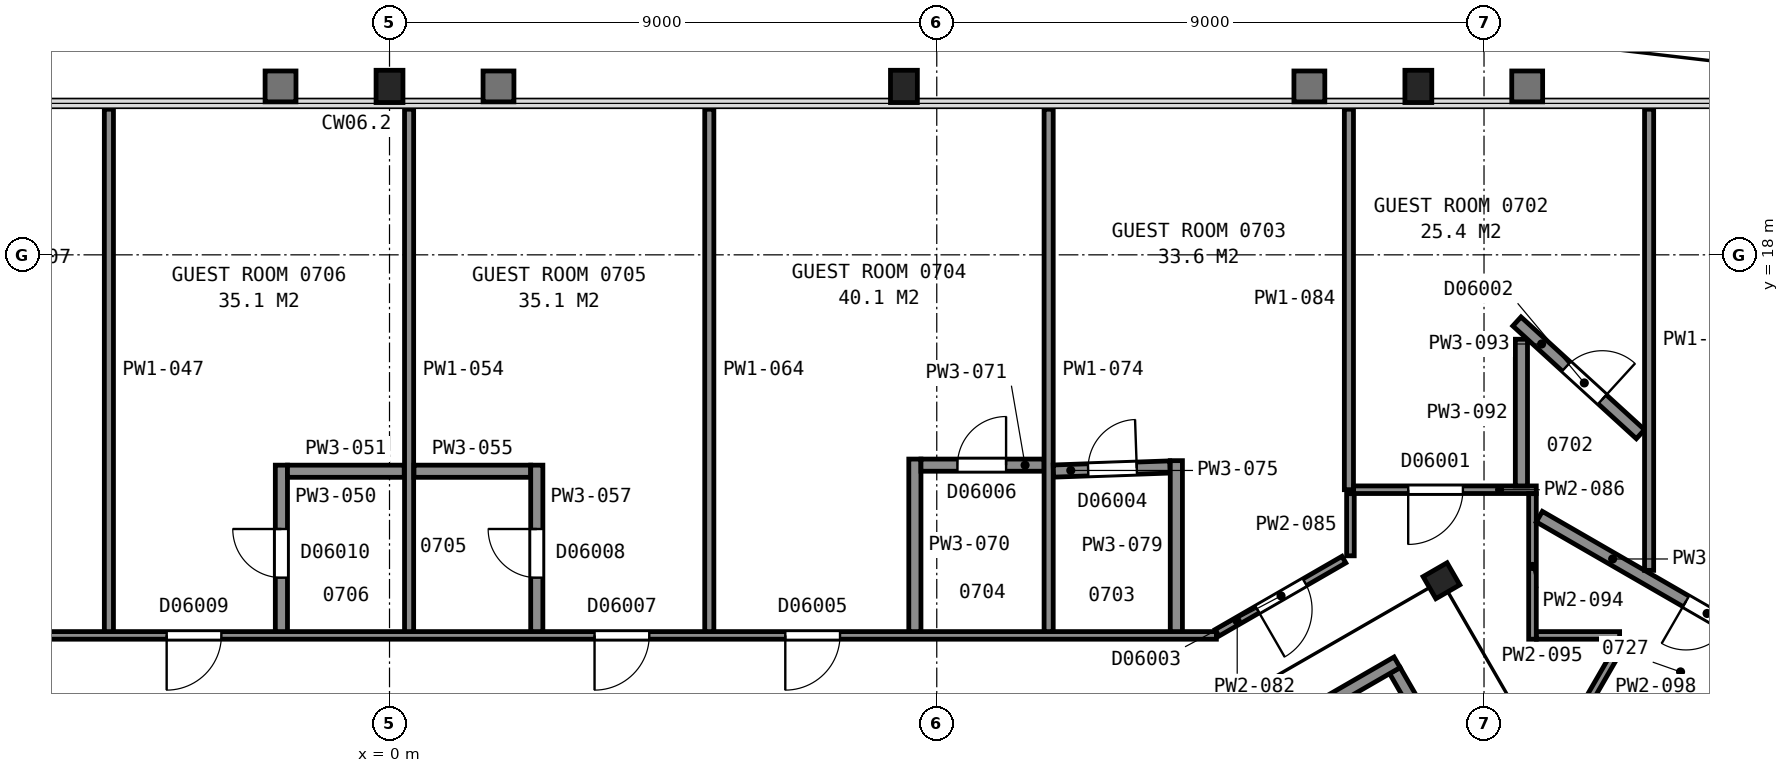
"""IFC4 building model, lengths in metres.
Left out: names, types, materials, properties, quantities, classifications, styles, units other than length and angle.
Written with IfcOpenShell. Run it as: python <this file> out.ifc"""

import sys

from ifc_helpers import new_model, si_unit, direction, frame, frame_2d, origin, origin_2d, place, context, subcontext, project, spatial, rectangle, i_section, extrude, element, fill, save


model = new_model("IFC4")
c1 = context("Model", 3, precision=1e-05, world=origin(), true_north=direction((0.0, 1.0)))
c2 = subcontext(c1, "Body", "Model", "MODEL_VIEW")
j1 = project(units=[si_unit("LENGTHUNIT", "METRE"), si_unit("PLANEANGLEUNIT", "RADIAN")], contexts=[c1])
p1 = place(None, origin())
s1 = spatial("IfcSite", under=j1, at=p1, CompositionType="ELEMENT")
p2 = place(p1, origin())
s2 = spatial("IfcBuilding", under=s1, at=p2, CompositionType="ELEMENT")
p3 = place(p2, frame((0.0, 0.0, 40.4)))
s3 = spatial("IfcBuildingStorey", under=s2, at=p3, CompositionType="ELEMENT", Elevation=40.4)
for number, where, z_axis, x_axis in (
    (1, (16.92, 20.77, 0.0), (0.0, 0.0, 1.0), (1.0, 0.0, 0.0)),
    (2, (8.46, 20.77, 0.0), (0.0, 0.0, 1.0), (1.0, 0.0, 0.0)),
    (3, (0.0, 20.77, 0.0), (0.0, 0.0, 1.0), (1.0, 0.0, 0.0)),
):
    element("IfcColumn", number, at=place(p3, frame(where, z_axis=z_axis, x_axis=x_axis)), inside=s3, PredefinedType="COLUMN", context=c2, shape_type="SweptSolid", body=[
        extrude(i_section(OverallWidth=0.442, OverallDepth=0.531, WebThickness=0.066, FlangeThickness=0.106, FilletRadius=0.015, at=origin_2d()), origin(), (0.0, 0.0, 1.0), 3.575),
    ])
p4 = place(p3, frame((17.3, 12.64, 0.0), z_axis=(0.0, 0.0, 1.0), x_axis=(0.5, -0.866025403784, 0.0)))
e4 = element("IfcColumn", 4, at=p4, inside=s3, PredefinedType="COLUMN", context=c2, shape_type="SweptSolid", body=[
    extrude(i_section(OverallWidth=0.419, OverallDepth=0.455, WebThickness=0.042, FlangeThickness=0.068, FilletRadius=0.015, at=origin_2d()), origin(), (0.0, 0.0, 1.0), 3.6),
])
p5 = place(p3, frame((17.934, 8.738, 0.0), z_axis=(0.0, 0.0, 1.0), x_axis=(-0.49998411664, 0.866034573852, 0.0)))
e5 = element("IfcWall", 5, at=p5, inside=s3, PredefinedType="PARTITIONING", context=c2, shape_type="SweptSolid", body=[
    extrude(rectangle(XDim=2.8, YDim=0.2, at=frame_2d((1.4, 0.0))), origin(), (0.0, 0.0, 1.0), 3.35),
])
p6 = place(p5, frame((0.85, 0.0, 0.0)))
e6 = element("IfcOpeningElement", 6, at=p6, cuts=e5, PredefinedType="OPENING", context=c2, shape_type="SweptSolid", body=[
    extrude(rectangle(XDim=1.1, YDim=2.1, at=frame_2d((0.55, 1.05))), frame((0.0, 0.11, 0.0), z_axis=(0.0, -1.0, 0.0), x_axis=(1.0, 0.0, 0.0)), (0.0, 0.0, 1.0), 0.22),
])
p7 = place(p3, frame((6.178, 5.299, 0.0), z_axis=(0.0, 0.0, 1.0), x_axis=(0.866026010844, 0.49999894854, 0.0)))
e7 = element("IfcWall", 7, at=p7, inside=s3, PredefinedType="PARTITIONING", context=c2, shape_type="SweptSolid", body=[
    extrude(rectangle(XDim=12.0, YDim=0.2, at=frame_2d((6.0, 0.0))), origin(), (0.0, 0.0, 1.0), 3.35),
])
p8 = place(p3, frame((-13.598, 11.741, 0.0), z_axis=(0.0, 0.0, 1.0), x_axis=(1.0, 0.0, 0.0)))
e8 = element("IfcWall", 8, at=p8, inside=s3, PredefinedType="PARTITIONING", context=c2, shape_type="SweptSolid", body=[
    extrude(rectangle(XDim=27.197, YDim=0.125, at=frame_2d((13.598, 0.0))), origin(), (0.0, 0.0, 1.0), 2.613),
])
p9 = place(p8, frame((20.107, 0.0, 0.0)))
e9 = element("IfcOpeningElement", 9, at=p9, cuts=e8, PredefinedType="OPENING", context=c2, shape_type="SweptSolid", body=[
    extrude(rectangle(XDim=0.9, YDim=2.1, at=frame_2d((0.45, 1.05))), frame((0.0, 0.073, 0.0), z_axis=(0.0, -1.0, 0.0), x_axis=(1.0, 0.0, 0.0)), (0.0, 0.0, 1.0), 0.145),
])
p10 = place(p8, frame((16.97, 0.0, 0.0)))
e10 = element("IfcOpeningElement", 10, at=p10, cuts=e8, PredefinedType="OPENING", context=c2, shape_type="SweptSolid", body=[
    extrude(rectangle(XDim=0.9, YDim=2.1, at=frame_2d((0.45, 1.05))), frame((0.0, 0.073, 0.0), z_axis=(0.0, -1.0, 0.0), x_axis=(1.0, 0.0, 0.0)), (0.0, 0.0, 1.0), 0.145),
])
p11 = place(p8, frame((9.934, 0.0, 0.0)))
e11 = element("IfcOpeningElement", 11, at=p11, cuts=e8, PredefinedType="OPENING", context=c2, shape_type="SweptSolid", body=[
    extrude(rectangle(XDim=0.9, YDim=2.1, at=frame_2d((0.45, 1.05))), frame((0.0, 0.073, 0.0), z_axis=(0.0, -1.0, 0.0), x_axis=(1.0, 0.0, 0.0)), (0.0, 0.0, 1.0), 0.145),
])
p12 = place(p8, frame((6.858, 0.0, 0.0)))
e12 = element("IfcOpeningElement", 12, at=p12, cuts=e8, PredefinedType="OPENING", context=c2, shape_type="SweptSolid", body=[
    extrude(rectangle(XDim=1.0, YDim=2.1, at=frame_2d((0.5, 1.05))), frame((0.0, 0.073, 0.0), z_axis=(0.0, -1.0, 0.0), x_axis=(1.0, 0.0, 0.0)), (0.0, 0.0, 1.0), 0.145),
])
p13 = place(p3, frame((-4.615, 11.803, 0.0), z_axis=(0.0, 0.0, 1.0), x_axis=(0.0, 1.0, 0.0)))
e13 = element("IfcWall", 13, at=p13, inside=s3, PredefinedType="PARTITIONING", context=c2, shape_type="SweptSolid", body=[
    extrude(rectangle(XDim=8.592, YDim=0.15, at=frame_2d((4.296, 0.0))), origin(), (0.0, 0.0, 1.0), 2.613),
])
p14 = place(p3, frame((-1.778, 14.541, 0.0), z_axis=(0.0, 0.0, 1.0), x_axis=(0.0, -1.0, 0.0)))
e14 = element("IfcWall", 14, at=p14, inside=s3, PredefinedType="PARTITIONING", context=c2, shape_type="SweptSolid", body=[
    extrude(rectangle(XDim=2.738, YDim=0.2, at=frame_2d((1.369, 0.0))), origin(), (0.0, 0.0, 1.0), 2.613),
])
p15 = place(p14, frame((1.05, 0.0, 0.0)))
e15 = element("IfcOpeningElement", 15, at=p15, cuts=e14, PredefinedType="OPENING", context=c2, shape_type="SweptSolid", body=[
    extrude(rectangle(XDim=0.8, YDim=2.1, at=frame_2d((0.4, 1.05))), frame((0.0, 0.11, 0.0), z_axis=(0.0, -1.0, 0.0), x_axis=(1.0, 0.0, 0.0)), (0.0, 0.0, 1.0), 0.22),
])
p16 = place(p3, frame((-1.678, 14.441, 0.0), z_axis=(0.0, 0.0, 1.0), x_axis=(1.0, 0.0, 0.0)))
e16 = element("IfcWall", 16, at=p16, inside=s3, PredefinedType="PARTITIONING", context=c2, shape_type="SweptSolid", body=[
    extrude(rectangle(XDim=1.92, YDim=0.2, at=frame_2d((0.96, 0.0))), origin(), (0.0, 0.0, 1.0), 2.613),
])
p17 = place(p3, frame((0.322, 11.803, 0.0), z_axis=(0.0, 0.0, 1.0), x_axis=(0.0, 1.0, 0.0)))
e17 = element("IfcWall", 17, at=p17, inside=s3, PredefinedType="PARTITIONING", context=c2, shape_type="SweptSolid", body=[
    extrude(rectangle(XDim=8.592, YDim=0.15, at=frame_2d((4.296, 0.0))), origin(), (0.0, 0.0, 1.0), 2.613),
])
p18 = place(p3, frame((0.402, 14.441, 0.0), z_axis=(0.0, 0.0, 1.0), x_axis=(1.0, 0.0, 0.0)))
e18 = element("IfcWall", 18, at=p18, inside=s3, PredefinedType="PARTITIONING", context=c2, shape_type="SweptSolid", body=[
    extrude(rectangle(XDim=1.92, YDim=0.2, at=frame_2d((0.96, 0.0))), origin(), (0.0, 0.0, 1.0), 2.613),
])
p19 = place(p3, frame((2.422, 11.803, 0.0), z_axis=(0.0, 0.0, 1.0), x_axis=(0.0, 1.0, 0.0)))
e19 = element("IfcWall", 19, at=p19, inside=s3, PredefinedType="PARTITIONING", context=c2, shape_type="SweptSolid", body=[
    extrude(rectangle(XDim=2.738, YDim=0.2, at=frame_2d((1.369, 0.0))), origin(), (0.0, 0.0, 1.0), 2.613),
])
p20 = place(p19, frame((0.887, 0.0, 0.0)))
e20 = element("IfcOpeningElement", 20, at=p20, cuts=e19, PredefinedType="OPENING", context=c2, shape_type="SweptSolid", body=[
    extrude(rectangle(XDim=0.8, YDim=2.1, at=frame_2d((0.4, 1.05))), frame((0.0, 0.11, 0.0), z_axis=(0.0, -1.0, 0.0), x_axis=(1.0, 0.0, 0.0)), (0.0, 0.0, 1.0), 0.22),
])
p21 = place(p3, frame((5.259, 11.803, 0.0), z_axis=(0.0, 0.0, 1.0), x_axis=(0.0, 1.0, 0.0)))
e21 = element("IfcWall", 21, at=p21, inside=s3, PredefinedType="PARTITIONING", context=c2, shape_type="SweptSolid", body=[
    extrude(rectangle(XDim=8.592, YDim=0.15, at=frame_2d((4.296, 0.0))), origin(), (0.0, 0.0, 1.0), 2.613),
])
p22 = place(p3, frame((8.64, 11.803, 0.0), z_axis=(0.0, 0.0, 1.0), x_axis=(0.0, 1.0, 0.0)))
e22 = element("IfcWall", 22, at=p22, inside=s3, PredefinedType="PARTITIONING", context=c2, shape_type="SweptSolid", body=[
    extrude(rectangle(XDim=2.838, YDim=0.2, at=frame_2d((1.419, 0.0))), origin(), (0.0, 0.0, 1.0), 2.613),
])
p23 = place(p3, frame((10.765, 14.541, 0.0), z_axis=(0.0, 0.0, 1.0), x_axis=(-1.0, 0.0, 0.0)))
e23 = element("IfcWall", 23, at=p23, inside=s3, PredefinedType="PARTITIONING", context=c2, shape_type="SweptSolid", body=[
    extrude(rectangle(XDim=2.025, YDim=0.2, at=frame_2d((1.012, 0.0))), origin(), (0.0, 0.0, 1.0), 2.613),
])
p24 = place(p23, frame((0.625, 0.0, 0.0)))
e24 = element("IfcOpeningElement", 24, at=p24, cuts=e23, PredefinedType="OPENING", context=c2, shape_type="SweptSolid", body=[
    extrude(rectangle(XDim=0.8, YDim=2.1, at=frame_2d((0.4, 1.05))), frame((0.0, 0.11, 0.0), z_axis=(0.0, -1.0, 0.0), x_axis=(1.0, 0.0, 0.0)), (0.0, 0.0, 1.0), 0.22),
])
p25 = place(p3, frame((10.84, 11.803, 0.0), z_axis=(0.0, 0.0, 1.0), x_axis=(0.0, 1.0, 0.0)))
e25 = element("IfcWall", 25, at=p25, inside=s3, PredefinedType="PARTITIONING", context=c2, shape_type="SweptSolid", body=[
    extrude(rectangle(XDim=8.592, YDim=0.15, at=frame_2d((4.296, 0.0))), origin(), (0.0, 0.0, 1.0), 2.613),
])
p26 = place(p3, frame((12.835, 14.511, 0.0), z_axis=(0.0, 0.0, 1.0), x_axis=(-0.999382486529, -0.035137524367, 0.0)))
e26 = element("IfcWall", 26, at=p26, inside=s3, PredefinedType="PARTITIONING", context=c2, shape_type="SweptSolid", body=[
    extrude(rectangle(XDim=1.918, YDim=0.2, at=frame_2d((0.959, 0.0))), origin(), (0.0, 0.0, 1.0), 2.613),
])
p27 = place(p26, frame((0.546, 0.0, 0.0)))
e27 = element("IfcOpeningElement", 27, at=p27, cuts=e26, PredefinedType="OPENING", context=c2, shape_type="SweptSolid", body=[
    extrude(rectangle(XDim=0.8, YDim=2.1, at=frame_2d((0.4, 1.05))), frame((0.0, 0.11, 0.0), z_axis=(0.0, -1.0, 0.0), x_axis=(1.0, 0.0, 0.0)), (0.0, 0.0, 1.0), 0.22),
])
p28 = place(p3, frame((12.94, 11.803, 0.0), z_axis=(0.0, 0.0, 1.0), x_axis=(0.0, 1.0, 0.0)))
e28 = element("IfcWall", 28, at=p28, inside=s3, PredefinedType="PARTITIONING", context=c2, shape_type="SweptSolid", body=[
    extrude(rectangle(XDim=2.812, YDim=0.2, at=frame_2d((1.406, 0.0))), origin(), (0.0, 0.0, 1.0), 2.613),
])
p29 = place(p3, frame((13.61, 11.783, 0.0), z_axis=(0.0, 0.0, 1.0), x_axis=(0.86608938841, 0.499889158998, 0.0)))
e29 = element("IfcWall", 29, at=p29, inside=s3, PredefinedType="PARTITIONING", context=c2, shape_type="SweptSolid", body=[
    extrude(rectangle(XDim=2.409, YDim=0.125, at=frame_2d((1.204, 0.0))), origin(), (0.0, 0.0, 1.0), 2.613),
])
p30 = place(p29, frame((0.765, 0.0, 0.0)))
e30 = element("IfcOpeningElement", 30, at=p30, cuts=e29, PredefinedType="OPENING", context=c2, shape_type="SweptSolid", body=[
    extrude(rectangle(XDim=0.9, YDim=2.1, at=frame_2d((0.45, 1.05))), frame((0.0, 0.073, 0.0), z_axis=(0.0, -1.0, 0.0), x_axis=(1.0, 0.0, 0.0)), (0.0, 0.0, 1.0), 0.145),
])
p31 = place(p3, frame((15.778, 14.137, 0.0), z_axis=(0.0, 0.0, 1.0), x_axis=(0.0, 1.0, 0.0)))
e31 = element("IfcWall", 31, at=p31, inside=s3, PredefinedType="PARTITIONING", context=c2, shape_type="SweptSolid", body=[
    extrude(rectangle(XDim=6.258, YDim=0.15, at=frame_2d((3.129, 0.0))), origin(), (0.0, 0.0, 1.0), 2.613),
])
p32 = place(p3, frame((15.803, 13.05, 0.0), z_axis=(0.0, 0.0, 1.0), x_axis=(0.0, 1.0, 0.0)))
e32 = element("IfcWall", 32, at=p32, inside=s3, PredefinedType="PARTITIONING", context=c2, shape_type="SweptSolid", body=[
    extrude(rectangle(XDim=1.022, YDim=0.125, at=frame_2d((0.511, 0.0))), origin(), (0.0, 0.0, 1.0), 2.613),
])
p33 = place(p3, frame((15.855, 14.137, 0.0), z_axis=(0.0, 0.0, 1.0), x_axis=(1.0, 0.0, 0.0)))
e33 = element("IfcWall", 33, at=p33, inside=s3, PredefinedType="PARTITIONING", context=c2, shape_type="SweptSolid", body=[
    extrude(rectangle(XDim=3.004, YDim=0.125, at=frame_2d((1.502, 0.0))), origin(), (0.0, 0.0, 1.0), 2.613),
])
p34 = place(p33, frame((0.897, 0.0, 0.0)))
e34 = element("IfcOpeningElement", 34, at=p34, cuts=e33, PredefinedType="OPENING", context=c2, shape_type="SweptSolid", body=[
    extrude(rectangle(XDim=0.9, YDim=2.1, at=frame_2d((0.45, 1.05))), frame((0.0, 0.073, 0.0), z_axis=(0.0, -1.0, 0.0), x_axis=(1.0, 0.0, 0.0)), (0.0, 0.0, 1.0), 0.145),
])
p35 = place(p3, frame((18.615, 14.199, 0.0), z_axis=(0.0, 0.0, 1.0), x_axis=(0.0, 1.0, 0.0)))
e35 = element("IfcWall", 35, at=p35, inside=s3, PredefinedType="PARTITIONING", context=c2, shape_type="SweptSolid", body=[
    extrude(rectangle(XDim=2.413, YDim=0.2, at=frame_2d((1.206, 0.0))), origin(), (0.0, 0.0, 1.0), 2.613),
])
p36 = place(p3, frame((20.573, 15.05, 0.0), z_axis=(0.0, 0.0, 1.0), x_axis=(-0.738508553587, 0.674244107337, 0.0)))
e36 = element("IfcWall", 36, at=p36, inside=s3, PredefinedType="PARTITIONING", context=c2, shape_type="SweptSolid", body=[
    extrude(rectangle(XDim=2.75, YDim=0.2, at=frame_2d((1.375, 0.0))), origin(), (0.0, 0.0, 1.0), 2.613),
])
p37 = place(p36, frame((0.851, 0.0, 0.0)))
e37 = element("IfcOpeningElement", 37, at=p37, cuts=e36, PredefinedType="OPENING", context=c2, shape_type="SweptSolid", body=[
    extrude(rectangle(XDim=0.8, YDim=2.1, at=frame_2d((0.4, 1.05))), frame((0.0, 0.11, 0.0), z_axis=(0.0, -1.0, 0.0), x_axis=(1.0, 0.0, 0.0)), (0.0, 0.0, 1.0), 0.22),
])
p38 = place(p3, frame((18.797, 11.678, 0.0), z_axis=(0.0, 0.0, 1.0), x_axis=(0.0, 1.0, 0.0)))
e38 = element("IfcWall", 38, at=p38, inside=s3, PredefinedType="PARTITIONING", context=c2, shape_type="SweptSolid", body=[
    extrude(rectangle(XDim=2.394, YDim=0.125, at=frame_2d((1.197, 0.0))), origin(), (0.0, 0.0, 1.0), 2.613),
])
p39 = place(p3, frame((18.862, 11.741, 0.0), z_axis=(0.0, 0.0, 1.0), x_axis=(1.0, 0.0, 0.0)))
e39 = element("IfcWall", 39, at=p39, inside=s3, PredefinedType="PARTITIONING", context=c2, shape_type="SweptSolid", body=[
    extrude(rectangle(XDim=1.368, YDim=0.125, at=frame_2d((0.684, 0.0))), origin(), (0.0, 0.0, 1.0), 2.613),
])
p40 = place(p3, frame((22.718, 11.496, 0.0), z_axis=(0.0, 0.0, 1.0), x_axis=(-0.866085733908, 0.499895490599, 0.0)))
e40 = element("IfcWall", 40, at=p40, inside=s3, PredefinedType="PARTITIONING", context=c2, shape_type="SweptSolid", body=[
    extrude(rectangle(XDim=4.397, YDim=0.2, at=frame_2d((2.198, 0.0))), origin(), (0.0, 0.0, 1.0), 2.613),
])
p41 = place(p40, frame((0.812, 0.0, 0.0)))
e41 = element("IfcOpeningElement", 41, at=p41, cuts=e40, PredefinedType="OPENING", context=c2, shape_type="SweptSolid", body=[
    extrude(rectangle(XDim=0.8, YDim=2.1, at=frame_2d((0.4, 1.05))), frame((0.0, 0.11, 0.0), z_axis=(0.0, -1.0, 0.0), x_axis=(1.0, 0.0, 0.0)), (0.0, 0.0, 1.0), 0.22),
])
p42 = place(p3, frame((19.39, 10.103, 0.0), z_axis=(0.0, 0.0, 1.0), x_axis=(0.500327160669, 0.865836435071, 0.0)))
e42 = element("IfcWall", 42, at=p42, inside=s3, PredefinedType="PARTITIONING", context=c2, shape_type="SweptSolid", body=[
    extrude(rectangle(XDim=1.805, YDim=0.125, at=frame_2d((0.903, 0.0))), origin(), (0.0, 0.0, 1.0), 2.613),
])
p43 = place(p3, frame((20.715, 12.811, 0.0), z_axis=(0.0, 0.0, 1.0), x_axis=(0.0, 1.0, 0.0)))
e43 = element("IfcWall", 43, at=p43, inside=s3, PredefinedType="PARTITIONING", context=c2, shape_type="SweptSolid", body=[
    extrude(rectangle(XDim=7.584, YDim=0.15, at=frame_2d((3.792, 0.0))), origin(), (0.0, 0.0, 1.0), 2.613),
])
p44 = place(p9, origin())
e44 = element("IfcDoor", 44, at=p44, inside=s3, OperationType="SINGLE_SWING_LEFT", PredefinedType="DOOR", context=c2, shape_type="SweptSolid", body=[
    extrude(rectangle(XDim=0.9, YDim=2.1, at=frame_2d((0.45, 1.05))), frame((0.0, 0.025, 0.0), z_axis=(0.0, -1.0, 0.0), x_axis=(1.0, 0.0, 0.0)), (0.0, 0.0, 1.0), 0.05),
])
fill(e9, e44)
p45 = place(p10, origin())
e45 = element("IfcDoor", 45, at=p45, inside=s3, OperationType="SINGLE_SWING_LEFT", PredefinedType="DOOR", context=c2, shape_type="SweptSolid", body=[
    extrude(rectangle(XDim=0.9, YDim=2.1, at=frame_2d((0.45, 1.05))), frame((0.0, 0.025, 0.0), z_axis=(0.0, -1.0, 0.0), x_axis=(1.0, 0.0, 0.0)), (0.0, 0.0, 1.0), 0.05),
])
fill(e10, e45)
p46 = place(p11, origin())
e46 = element("IfcDoor", 46, at=p46, inside=s3, OperationType="SINGLE_SWING_LEFT", PredefinedType="DOOR", context=c2, shape_type="SweptSolid", body=[
    extrude(rectangle(XDim=0.9, YDim=2.1, at=frame_2d((0.45, 1.05))), frame((0.0, 0.025, 0.0), z_axis=(0.0, -1.0, 0.0), x_axis=(1.0, 0.0, 0.0)), (0.0, 0.0, 1.0), 0.05),
])
fill(e11, e46)
p47 = place(p15, origin())
e47 = element("IfcDoor", 47, at=p47, inside=s3, OperationType="SINGLE_SWING_LEFT", PredefinedType="DOOR", context=c2, shape_type="SweptSolid", body=[
    extrude(rectangle(XDim=0.8, YDim=2.1, at=frame_2d((0.4, 1.05))), frame((0.0, 0.025, 0.0), z_axis=(0.0, -1.0, 0.0), x_axis=(1.0, 0.0, 0.0)), (0.0, 0.0, 1.0), 0.05),
])
fill(e15, e47)
p48 = place(p20, origin())
e48 = element("IfcDoor", 48, at=p48, inside=s3, OperationType="SINGLE_SWING_RIGHT", PredefinedType="DOOR", context=c2, shape_type="SweptSolid", body=[
    extrude(rectangle(XDim=0.8, YDim=2.1, at=frame_2d((0.4, 1.05))), frame((0.0, 0.025, 0.0), z_axis=(0.0, -1.0, 0.0), x_axis=(1.0, 0.0, 0.0)), (0.0, 0.0, 1.0), 0.05),
])
fill(e20, e48)
p49 = place(p24, origin())
e49 = element("IfcDoor", 49, at=p49, inside=s3, OperationType="SINGLE_SWING_LEFT", PredefinedType="DOOR", context=c2, shape_type="SweptSolid", body=[
    extrude(rectangle(XDim=0.8, YDim=2.1, at=frame_2d((0.4, 1.05))), frame((0.0, 0.025, 0.0), z_axis=(0.0, -1.0, 0.0), x_axis=(1.0, 0.0, 0.0)), (0.0, 0.0, 1.0), 0.05),
])
fill(e24, e49)
p50 = place(p27, origin())
e50 = element("IfcDoor", 50, at=p50, inside=s3, OperationType="SINGLE_SWING_LEFT", PredefinedType="DOOR", context=c2, shape_type="SweptSolid", body=[
    extrude(rectangle(XDim=0.8, YDim=2.1, at=frame_2d((0.4, 1.05))), frame((0.0, 0.025, 0.0), z_axis=(0.0, -1.0, 0.0), x_axis=(1.0, 0.0, 0.0)), (0.0, 0.0, 1.0), 0.05),
])
fill(e27, e50)
p51 = place(p30, origin())
e51 = element("IfcDoor", 51, at=p51, inside=s3, OperationType="SINGLE_SWING_LEFT", PredefinedType="DOOR", context=c2, shape_type="SweptSolid", body=[
    extrude(rectangle(XDim=0.9, YDim=2.1, at=frame_2d((0.45, 1.05))), frame((0.0, 0.025, 0.0), z_axis=(0.0, -1.0, 0.0), x_axis=(1.0, 0.0, 0.0)), (0.0, 0.0, 1.0), 0.05),
])
fill(e30, e51)
p52 = place(p34, origin())
e52 = element("IfcDoor", 52, at=p52, inside=s3, OperationType="SINGLE_SWING_LEFT", PredefinedType="DOOR", context=c2, shape_type="SweptSolid", body=[
    extrude(rectangle(XDim=0.9, YDim=2.1, at=frame_2d((0.45, 1.05))), frame((0.0, 0.025, 0.0), z_axis=(0.0, -1.0, 0.0), x_axis=(1.0, 0.0, 0.0)), (0.0, 0.0, 1.0), 0.05),
])
fill(e34, e52)
p53 = place(p37, origin())
e53 = element("IfcDoor", 53, at=p53, inside=s3, OperationType="SINGLE_SWING_LEFT", PredefinedType="DOOR", context=c2, shape_type="SweptSolid", body=[
    extrude(rectangle(XDim=0.8, YDim=2.1, at=frame_2d((0.4, 1.05))), frame((0.0, 0.025, 0.0), z_axis=(0.0, -1.0, 0.0), x_axis=(1.0, 0.0, 0.0)), (0.0, 0.0, 1.0), 0.05),
])
fill(e37, e53)
p54 = place(p41, origin())
e54 = element("IfcDoor", 54, at=p54, inside=s3, OperationType="SINGLE_SWING_RIGHT", PredefinedType="DOOR", context=c2, shape_type="SweptSolid", body=[
    extrude(rectangle(XDim=0.8, YDim=2.1, at=frame_2d((0.4, 1.05))), frame((0.0, 0.025, 0.0), z_axis=(0.0, -1.0, 0.0), x_axis=(1.0, 0.0, 0.0)), (0.0, 0.0, 1.0), 0.05),
])
fill(e41, e54)
save(model, sys.argv[1])
